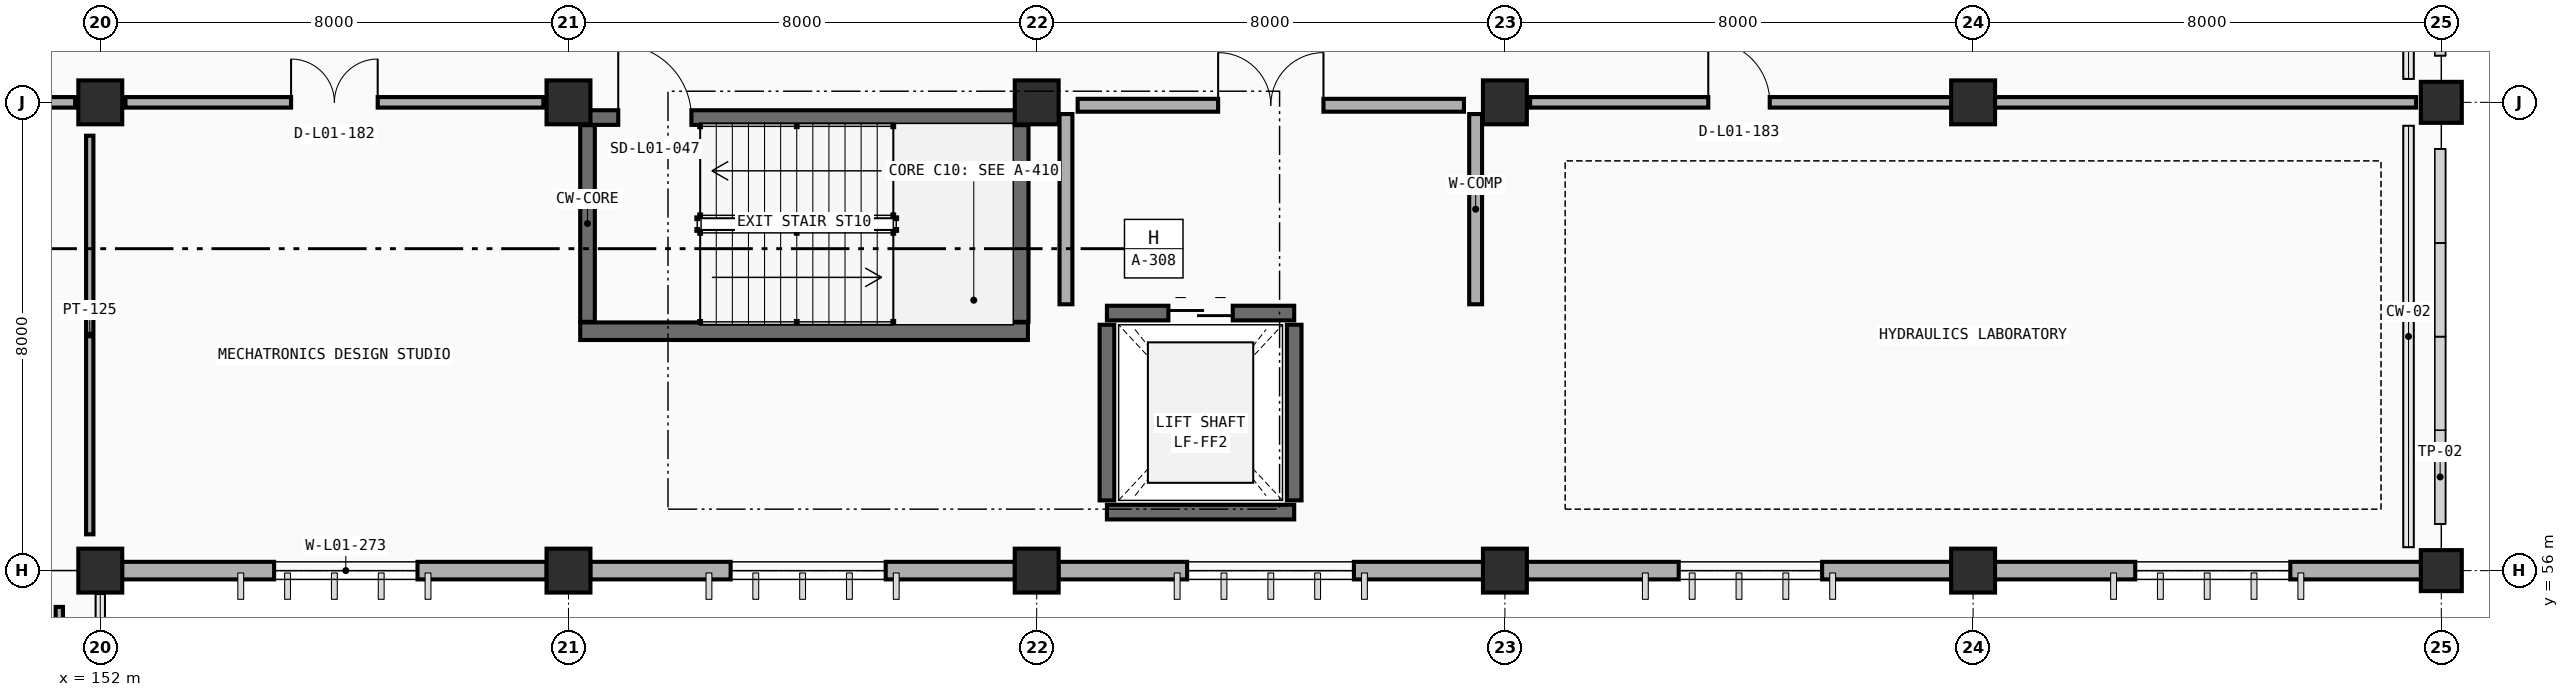
"""IFC4 building model, lengths in metres.
Left out: names, types, materials, properties, quantities, classifications, styles, units other than length and angle.
Written with IfcOpenShell. Run it as: python <this file> out.ifc"""

import sys

from ifc_helpers import new_model, si_unit, direction, frame, frame_2d, origin, origin_2d, place, context, subcontext, project, spatial, rectangle, extrude, element, fill, save


model = new_model("IFC4")
c1 = context("Model", 3, precision=1e-05, world=origin(), true_north=direction((0.0, 1.0)))
c2 = subcontext(c1, "Body", "Model", "MODEL_VIEW")
j1 = project(units=[si_unit("LENGTHUNIT", "METRE"), si_unit("PLANEANGLEUNIT", "RADIAN")], contexts=[c1])
p1 = place(None, origin())
s1 = spatial("IfcSite", under=j1, at=p1, CompositionType="ELEMENT")
p2 = place(p1, origin())
s2 = spatial("IfcBuilding", under=s1, at=p2, CompositionType="ELEMENT")
p3 = place(p2, origin())
s3 = spatial("IfcBuildingStorey", under=s2, at=p3, CompositionType="ELEMENT", Elevation=0.0)
for number, where, z_axis, x_axis in (
    (1, (152.0, 56.0, 0.0), (0.0, 0.0, 1.0), (1.0, 0.0, 0.0)),
    (2, (160.0, 56.0, 0.0), (0.0, 0.0, 1.0), (1.0, 0.0, 0.0)),
    (3, (168.0, 56.0, 0.0), (0.0, 0.0, 1.0), (1.0, 0.0, 0.0)),
    (4, (176.0, 56.0, 0.0), (0.0, 0.0, 1.0), (1.0, 0.0, 0.0)),
    (5, (184.0, 56.0, 0.0), (0.0, 0.0, 1.0), (1.0, 0.0, 0.0)),
):
    element("IfcColumn", number, at=place(p3, frame(where, z_axis=z_axis, x_axis=x_axis)), inside=s3, PredefinedType="COLUMN", context=c2, shape_type="SweptSolid", body=[
        extrude(rectangle(XDim=0.75, YDim=0.75, at=origin_2d()), origin(), (0.0, 0.0, 1.0), 4.8),
    ])
p4 = place(p3, frame((192.0, 56.0, 0.0), z_axis=(0.0, 0.0, 1.0), x_axis=(1.0, 0.0, 0.0)))
e6 = element("IfcColumn", 6, at=p4, inside=s3, PredefinedType="COLUMN", context=c2, shape_type="SweptSolid", body=[
    extrude(rectangle(XDim=0.7, YDim=0.7, at=origin_2d()), origin(), (0.0, 0.0, 1.0), 4.8),
])
for number, where, z_axis, x_axis in (
    (7, (152.0, 64.0, 0.0), (0.0, 0.0, 1.0), (1.0, 0.0, 0.0)),
    (8, (160.0, 64.0, 0.0), (0.0, 0.0, 1.0), (1.0, 0.0, 0.0)),
    (9, (168.0, 64.0, 0.0), (0.0, 0.0, 1.0), (1.0, 0.0, 0.0)),
    (10, (176.0, 64.0, 0.0), (0.0, 0.0, 1.0), (1.0, 0.0, 0.0)),
    (11, (184.0, 64.0, 0.0), (0.0, 0.0, 1.0), (1.0, 0.0, 0.0)),
):
    element("IfcColumn", number, at=place(p3, frame(where, z_axis=z_axis, x_axis=x_axis)), inside=s3, PredefinedType="COLUMN", context=c2, shape_type="SweptSolid", body=[
        extrude(rectangle(XDim=0.75, YDim=0.75, at=origin_2d()), origin(), (0.0, 0.0, 1.0), 4.8),
    ])
p5 = place(p3, frame((192.0, 64.0, 0.0), z_axis=(0.0, 0.0, 1.0), x_axis=(1.0, 0.0, 0.0)))
e12 = element("IfcColumn", 12, at=p5, inside=s3, PredefinedType="COLUMN", context=c2, shape_type="SweptSolid", body=[
    extrude(rectangle(XDim=0.7, YDim=0.7, at=origin_2d()), origin(), (0.0, 0.0, 1.0), 4.8),
])
p6 = place(p3, frame((159.628, 56.0, 0.0), z_axis=(0.0, 0.0, 1.0), x_axis=(-1.0, 0.0, 0.0)))
e13 = element("IfcWall", 13, at=p6, inside=s3, PredefinedType="STANDARD", context=c2, shape_type="SweptSolid", body=[
    extrude(rectangle(XDim=7.256, YDim=0.3, at=frame_2d((3.628, 0.0))), origin(), (0.0, 0.0, 1.0), 3.91),
])
p7 = place(p6, frame((2.208, 0.0, 0.9)))
e14 = element("IfcOpeningElement", 14, at=p7, cuts=e13, PredefinedType="OPENING", context=c2, shape_type="SweptSolid", body=[
    extrude(rectangle(XDim=2.45, YDim=1.85, at=frame_2d((1.225, 0.925))), frame((0.0, 0.16, 0.0), z_axis=(0.0, -1.0, 0.0), x_axis=(1.0, 0.0, 0.0)), (0.0, 0.0, 1.0), 0.32),
])
p8 = place(p3, frame((167.628, 56.0, 0.0), z_axis=(0.0, 0.0, 1.0), x_axis=(-1.0, 0.0, 0.0)))
e15 = element("IfcWall", 15, at=p8, inside=s3, PredefinedType="STANDARD", context=c2, shape_type="SweptSolid", body=[
    extrude(rectangle(XDim=7.256, YDim=0.3, at=frame_2d((3.628, 0.0))), origin(), (0.0, 0.0, 1.0), 3.91),
])
p9 = place(p8, frame((2.208, 0.0, 0.9)))
e16 = element("IfcOpeningElement", 16, at=p9, cuts=e15, PredefinedType="OPENING", context=c2, shape_type="SweptSolid", body=[
    extrude(rectangle(XDim=2.65, YDim=1.85, at=frame_2d((1.325, 0.925))), frame((0.0, 0.16, 0.0), z_axis=(0.0, -1.0, 0.0), x_axis=(1.0, 0.0, 0.0)), (0.0, 0.0, 1.0), 0.32),
])
p10 = place(p3, frame((175.628, 56.0, 0.0), z_axis=(0.0, 0.0, 1.0), x_axis=(-1.0, 0.0, 0.0)))
e17 = element("IfcWall", 17, at=p10, inside=s3, PredefinedType="STANDARD", context=c2, shape_type="SweptSolid", body=[
    extrude(rectangle(XDim=7.256, YDim=0.3, at=frame_2d((3.628, 0.0))), origin(), (0.0, 0.0, 1.0), 3.91),
])
p11 = place(p10, frame((2.208, 0.0, 0.9)))
e18 = element("IfcOpeningElement", 18, at=p11, cuts=e17, PredefinedType="OPENING", context=c2, shape_type="SweptSolid", body=[
    extrude(rectangle(XDim=2.85, YDim=1.85, at=frame_2d((1.425, 0.925))), frame((0.0, 0.16, 0.0), z_axis=(0.0, -1.0, 0.0), x_axis=(1.0, 0.0, 0.0)), (0.0, 0.0, 1.0), 0.32),
])
p12 = place(p3, frame((183.628, 56.0, 0.0), z_axis=(0.0, 0.0, 1.0), x_axis=(-1.0, 0.0, 0.0)))
e19 = element("IfcWall", 19, at=p12, inside=s3, PredefinedType="STANDARD", context=c2, shape_type="SweptSolid", body=[
    extrude(rectangle(XDim=7.256, YDim=0.3, at=frame_2d((3.628, 0.0))), origin(), (0.0, 0.0, 1.0), 3.91),
])
p13 = place(p12, frame((2.208, 0.0, 0.9)))
e20 = element("IfcOpeningElement", 20, at=p13, cuts=e19, PredefinedType="OPENING", context=c2, shape_type="SweptSolid", body=[
    extrude(rectangle(XDim=2.45, YDim=1.85, at=frame_2d((1.225, 0.925))), frame((0.0, 0.16, 0.0), z_axis=(0.0, -1.0, 0.0), x_axis=(1.0, 0.0, 0.0)), (0.0, 0.0, 1.0), 0.32),
])
p14 = place(p3, frame((191.653, 56.0, 0.0), z_axis=(0.0, 0.0, 1.0), x_axis=(-1.0, 0.0, 0.0)))
e21 = element("IfcWall", 21, at=p14, inside=s3, PredefinedType="STANDARD", context=c2, shape_type="SweptSolid", body=[
    extrude(rectangle(XDim=7.281, YDim=0.3, at=frame_2d((3.641, 0.0))), origin(), (0.0, 0.0, 1.0), 3.91),
])
p15 = place(p14, frame((2.233, 0.0, 0.9)))
e22 = element("IfcOpeningElement", 22, at=p15, cuts=e21, PredefinedType="OPENING", context=c2, shape_type="SweptSolid", body=[
    extrude(rectangle(XDim=2.65, YDim=1.85, at=frame_2d((1.325, 0.925))), frame((0.0, 0.16, 0.0), z_axis=(0.0, -1.0, 0.0), x_axis=(1.0, 0.0, 0.0)), (0.0, 0.0, 1.0), 0.32),
])
for number, where, z_axis, x_axis in (
    (23, (191.76, 56.22, 0.0), (0.0, 0.0, 1.0), (-1.0, 0.0, 0.0)),
    (24, (191.76, 63.78, 0.0), (0.0, 0.0, 1.0), (-1.0, 0.0, 0.0)),
    (25, (191.76, 64.22, 0.0), (0.0, 0.0, 1.0), (-1.0, 0.0, 0.0)),
):
    element("IfcWall", number, at=place(p3, frame(where, z_axis=z_axis, x_axis=x_axis)), inside=s3, PredefinedType="PARAPET", context=c2, shape_type="SweptSolid", body=[
        extrude(rectangle(XDim=0.32, YDim=0.2, at=frame_2d((0.16, 0.0))), origin(), (0.0, 0.0, 1.0), 3.95),
    ])
p16 = place(p3, frame((160.2, 60.09, 0.0), z_axis=(0.0, 0.0, 1.0), x_axis=(1.0, 0.0, 0.0)))
e26 = element("IfcWall", 26, at=p16, inside=s3, PredefinedType="SHEAR", context=c2, shape_type="SweptSolid", body=[
    extrude(rectangle(XDim=7.65, YDim=0.3, at=frame_2d((3.825, 0.0))), origin(), (0.0, 0.0, 1.0), 4.8),
])
p17 = place(p3, frame((167.71, 60.25, 0.0), z_axis=(0.0, 0.0, 1.0), x_axis=(0.0, 1.0, 0.0)))
e27 = element("IfcWall", 27, at=p17, inside=s3, PredefinedType="SHEAR", context=c2, shape_type="SweptSolid", body=[
    extrude(rectangle(XDim=3.36, YDim=0.3, at=frame_2d((1.68, 0.0))), origin(), (0.0, 0.0, 1.0), 4.8),
])
p18 = place(p3, frame((160.2, 63.74, 0.0), z_axis=(0.0, 0.0, 1.0), x_axis=(1.0, 0.0, 0.0)))
e28 = element("IfcWall", 28, at=p18, inside=s3, PredefinedType="SOLIDWALL", context=c2, shape_type="SweptSolid", body=[
    extrude(rectangle(XDim=7.65, YDim=0.25, at=frame_2d((3.825, 0.0))), origin(), (0.0, 0.0, 1.0), 4.8),
])
p19 = place(p18, frame((0.65, 0.0, 0.0)))
e29 = element("IfcOpeningElement", 29, at=p19, cuts=e28, PredefinedType="OPENING", context=c2, shape_type="SweptSolid", body=[
    extrude(rectangle(XDim=1.25, YDim=2.15, at=frame_2d((0.625, 1.075))), frame((0.0, 0.135, 0.0), z_axis=(0.0, -1.0, 0.0), x_axis=(1.0, 0.0, 0.0)), (0.0, 0.0, 1.0), 0.27),
])
p20 = place(p3, frame((160.325, 60.25, 0.0), z_axis=(0.0, 0.0, 1.0), x_axis=(0.0, 1.0, 0.0)))
e30 = element("IfcWall", 30, at=p20, inside=s3, PredefinedType="SOLIDWALL", context=c2, shape_type="SweptSolid", body=[
    extrude(rectangle(XDim=3.36, YDim=0.25, at=frame_2d((1.68, 0.0))), origin(), (0.0, 0.0, 1.0), 4.8),
])
p21 = place(p3, frame((169.2, 57.0, 0.0), z_axis=(0.0, 0.0, 1.0), x_axis=(1.0, 0.0, 0.0)))
e31 = element("IfcWall", 31, at=p21, inside=s3, PredefinedType="SOLIDWALL", context=c2, shape_type="SweptSolid", body=[
    extrude(rectangle(XDim=3.2, YDim=0.25, at=frame_2d((1.6, 0.0))), origin(), (0.0, 0.0, 1.0), 4.8),
])
p22 = place(p3, frame((169.2, 60.4, 0.0), z_axis=(0.0, 0.0, 1.0), x_axis=(1.0, 0.0, 0.0)))
e32 = element("IfcWall", 32, at=p22, inside=s3, PredefinedType="SOLIDWALL", context=c2, shape_type="SweptSolid", body=[
    extrude(rectangle(XDim=3.2, YDim=0.25, at=frame_2d((1.6, 0.0))), origin(), (0.0, 0.0, 1.0), 4.8),
])
p23 = place(p22, frame((1.05, 0.0, 0.0)))
e33 = element("IfcOpeningElement", 33, at=p23, cuts=e32, PredefinedType="OPENING", context=c2, shape_type="SweptSolid", body=[
    extrude(rectangle(XDim=1.1, YDim=2.15, at=frame_2d((0.55, 1.075))), frame((0.0, 0.135, 0.0), z_axis=(0.0, -1.0, 0.0), x_axis=(1.0, 0.0, 0.0)), (0.0, 0.0, 1.0), 0.27),
])
for number, where, z_axis, x_axis in (
    (34, (169.2, 57.2, 0.0), (0.0, 0.0, 1.0), (0.0, 1.0, 0.0)),
    (35, (172.4, 57.2, 0.0), (0.0, 0.0, 1.0), (0.0, 1.0, 0.0)),
):
    element("IfcWall", number, at=place(p3, frame(where, z_axis=z_axis, x_axis=x_axis)), inside=s3, PredefinedType="SOLIDWALL", context=c2, shape_type="SweptSolid", body=[
        extrude(rectangle(XDim=3.0, YDim=0.25, at=frame_2d((1.5, 0.0))), origin(), (0.0, 0.0, 1.0), 4.8),
    ])
p24 = place(p3, frame((168.7, 63.95, 0.0), z_axis=(0.0, 0.0, 1.0), x_axis=(1.0, 0.0, 0.0)))
e36 = element("IfcWall", 36, at=p24, inside=s3, PredefinedType="PARTITIONING", context=c2, shape_type="SweptSolid", body=[
    extrude(rectangle(XDim=6.6, YDim=0.22, at=frame_2d((3.3, 0.0))), origin(), (0.0, 0.0, 1.0), 3.81),
])
p25 = place(p24, frame((2.4, 0.0, 0.0)))
e37 = element("IfcOpeningElement", 37, at=p25, cuts=e36, PredefinedType="OPENING", context=c2, shape_type="SweptSolid", body=[
    extrude(rectangle(XDim=1.8, YDim=2.2, at=frame_2d((0.9, 1.1))), frame((0.0, 0.12, 0.0), z_axis=(0.0, -1.0, 0.0), x_axis=(1.0, 0.0, 0.0)), (0.0, 0.0, 1.0), 0.24),
])
for number, where, z_axis, x_axis in (
    (38, (168.5, 60.55, 0.0), (0.0, 0.0, 1.0), (0.0, 1.0, 0.0)),
    (39, (175.5, 60.55, 0.0), (0.0, 0.0, 1.0), (0.0, 1.0, 0.0)),
):
    element("IfcWall", number, at=place(p3, frame(where, z_axis=z_axis, x_axis=x_axis)), inside=s3, PredefinedType="PARTITIONING", context=c2, shape_type="SweptSolid", body=[
        extrude(rectangle(XDim=3.25, YDim=0.22, at=frame_2d((1.625, 0.0))), origin(), (0.0, 0.0, 1.0), 3.76),
    ])
p26 = place(p3, frame((136.43, 64.0, 0.0), z_axis=(0.0, 0.0, 1.0), x_axis=(1.0, 0.0, 0.0)))
e40 = element("IfcWall", 40, at=p26, inside=s3, PredefinedType="PARTITIONING", context=c2, shape_type="SweptSolid", body=[
    extrude(rectangle(XDim=15.14, YDim=0.18, at=frame_2d((7.57, 0.0))), origin(), (0.0, 0.0, 1.0), 3.81),
])
p27 = place(p26, frame((2.895, 0.0, 0.0)))
e41 = element("IfcOpeningElement", 41, at=p27, cuts=e40, PredefinedType="OPENING", context=c2, shape_type="SweptSolid", body=[
    extrude(rectangle(XDim=1.35, YDim=2.2, at=frame_2d((0.675, 1.1))), frame((0.0, 0.1, 0.0), z_axis=(0.0, -1.0, 0.0), x_axis=(1.0, 0.0, 0.0)), (0.0, 0.0, 1.0), 0.2),
])
p28 = place(p3, frame((151.82, 56.62, 0.0), z_axis=(0.0, 0.0, 1.0), x_axis=(0.0, 1.0, 0.0)))
e42 = element("IfcWall", 42, at=p28, inside=s3, PredefinedType="PARTITIONING", context=c2, shape_type="SweptSolid", body=[
    extrude(rectangle(XDim=6.81, YDim=0.125, at=frame_2d((3.405, 0.0))), origin(), (0.0, 0.0, 1.0), 3.76),
])
p29 = place(p3, frame((152.43, 64.0, 0.0), z_axis=(0.0, 0.0, 1.0), x_axis=(1.0, 0.0, 0.0)))
e43 = element("IfcWall", 43, at=p29, inside=s3, PredefinedType="PARTITIONING", context=c2, shape_type="SweptSolid", body=[
    extrude(rectangle(XDim=7.14, YDim=0.18, at=frame_2d((3.57, 0.0))), origin(), (0.0, 0.0, 1.0), 3.81),
])
p30 = place(p29, frame((2.83, 0.0, 0.0)))
e44 = element("IfcOpeningElement", 44, at=p30, cuts=e43, PredefinedType="OPENING", context=c2, shape_type="SweptSolid", body=[
    extrude(rectangle(XDim=1.48, YDim=2.2, at=frame_2d((0.74, 1.1))), frame((0.0, 0.1, 0.0), z_axis=(0.0, -1.0, 0.0), x_axis=(1.0, 0.0, 0.0)), (0.0, 0.0, 1.0), 0.2),
])
p31 = place(p3, frame((176.43, 64.0, 0.0), z_axis=(0.0, 0.0, 1.0), x_axis=(1.0, 0.0, 0.0)))
e45 = element("IfcWall", 45, at=p31, inside=s3, PredefinedType="PARTITIONING", context=c2, shape_type="SweptSolid", body=[
    extrude(rectangle(XDim=15.14, YDim=0.18, at=frame_2d((7.57, 0.0))), origin(), (0.0, 0.0, 1.0), 3.81),
])
p32 = place(p31, frame((3.045, 0.0, 0.0)))
e46 = element("IfcOpeningElement", 46, at=p32, cuts=e45, PredefinedType="OPENING", context=c2, shape_type="SweptSolid", body=[
    extrude(rectangle(XDim=1.05, YDim=2.15, at=frame_2d((0.525, 1.075))), frame((0.0, 0.1, 0.0), z_axis=(0.0, -1.0, 0.0), x_axis=(1.0, 0.0, 0.0)), (0.0, 0.0, 1.0), 0.2),
])
p33 = place(p3, frame((151.3, 48.62, 0.0), z_axis=(0.0, 0.0, 1.0), x_axis=(0.0, 1.0, 0.0)))
e47 = element("IfcWall", 47, at=p33, inside=s3, PredefinedType="PARTITIONING", context=c2, shape_type="SweptSolid", body=[
    extrude(rectangle(XDim=6.76, YDim=0.125, at=frame_2d((3.38, 0.0))), origin(), (0.0, 0.0, 1.0), 3.9),
])
p34 = place(p7, origin())
e48 = element("IfcWindow", 48, at=p34, inside=s3, PartitioningType="DOUBLE_PANEL_VERTICAL", PredefinedType="WINDOW", context=c2, shape_type="SweptSolid", body=[
    extrude(rectangle(XDim=2.45, YDim=1.85, at=frame_2d((1.225, 0.925))), frame((0.0, 0.03, 0.0), z_axis=(0.0, -1.0, 0.0), x_axis=(1.0, 0.0, 0.0)), (0.0, 0.0, 1.0), 0.06),
])
fill(e14, e48)
p35 = place(p9, origin())
e49 = element("IfcWindow", 49, at=p35, inside=s3, PartitioningType="DOUBLE_PANEL_VERTICAL", PredefinedType="WINDOW", context=c2, shape_type="SweptSolid", body=[
    extrude(rectangle(XDim=2.65, YDim=1.85, at=frame_2d((1.325, 0.925))), frame((0.0, 0.03, 0.0), z_axis=(0.0, -1.0, 0.0), x_axis=(1.0, 0.0, 0.0)), (0.0, 0.0, 1.0), 0.06),
])
fill(e16, e49)
p36 = place(p11, origin())
e50 = element("IfcWindow", 50, at=p36, inside=s3, PartitioningType="DOUBLE_PANEL_VERTICAL", PredefinedType="WINDOW", context=c2, shape_type="SweptSolid", body=[
    extrude(rectangle(XDim=2.85, YDim=1.85, at=frame_2d((1.425, 0.925))), frame((0.0, 0.03, 0.0), z_axis=(0.0, -1.0, 0.0), x_axis=(1.0, 0.0, 0.0)), (0.0, 0.0, 1.0), 0.06),
])
fill(e18, e50)
p37 = place(p13, origin())
e51 = element("IfcWindow", 51, at=p37, inside=s3, PartitioningType="DOUBLE_PANEL_VERTICAL", PredefinedType="WINDOW", context=c2, shape_type="SweptSolid", body=[
    extrude(rectangle(XDim=2.45, YDim=1.85, at=frame_2d((1.225, 0.925))), frame((0.0, 0.03, 0.0), z_axis=(0.0, -1.0, 0.0), x_axis=(1.0, 0.0, 0.0)), (0.0, 0.0, 1.0), 0.06),
])
fill(e20, e51)
p38 = place(p15, origin())
e52 = element("IfcWindow", 52, at=p38, inside=s3, PartitioningType="DOUBLE_PANEL_VERTICAL", PredefinedType="WINDOW", context=c2, shape_type="SweptSolid", body=[
    extrude(rectangle(XDim=2.65, YDim=1.85, at=frame_2d((1.325, 0.925))), frame((0.0, 0.03, 0.0), z_axis=(0.0, -1.0, 0.0), x_axis=(1.0, 0.0, 0.0)), (0.0, 0.0, 1.0), 0.06),
])
fill(e22, e52)
p39 = place(p19, origin())
e53 = element("IfcDoor", 53, at=p39, inside=s3, OperationType="SINGLE_SWING_LEFT", PredefinedType="DOOR", context=c2, shape_type="SweptSolid", body=[
    extrude(rectangle(XDim=1.25, YDim=2.15, at=frame_2d((0.625, 1.075))), frame((0.0, 0.025, 0.0), z_axis=(0.0, -1.0, 0.0), x_axis=(1.0, 0.0, 0.0)), (0.0, 0.0, 1.0), 0.05),
])
fill(e29, e53)
p40 = place(p23, origin())
e54 = element("IfcDoor", 54, at=p40, inside=s3, OperationType="DOUBLE_DOOR_SLIDING", PredefinedType="DOOR", context=c2, shape_type="SweptSolid", body=[
    extrude(rectangle(XDim=1.1, YDim=2.15, at=frame_2d((0.55, 1.075))), frame((0.0, 0.025, 0.0), z_axis=(0.0, -1.0, 0.0), x_axis=(1.0, 0.0, 0.0)), (0.0, 0.0, 1.0), 0.05),
])
fill(e33, e54)
p41 = place(p25, origin())
e55 = element("IfcDoor", 55, at=p41, inside=s3, OperationType="DOUBLE_DOOR_SINGLE_SWING", PredefinedType="DOOR", context=c2, shape_type="SweptSolid", body=[
    extrude(rectangle(XDim=1.8, YDim=2.2, at=frame_2d((0.9, 1.1))), frame((0.0, 0.025, 0.0), z_axis=(0.0, -1.0, 0.0), x_axis=(1.0, 0.0, 0.0)), (0.0, 0.0, 1.0), 0.05),
])
fill(e37, e55)
p42 = place(p30, origin())
e56 = element("IfcDoor", 56, at=p42, inside=s3, OperationType="DOUBLE_DOOR_SINGLE_SWING", PredefinedType="DOOR", context=c2, shape_type="SweptSolid", body=[
    extrude(rectangle(XDim=1.48, YDim=2.2, at=frame_2d((0.74, 1.1))), frame((0.0, 0.025, 0.0), z_axis=(0.0, -1.0, 0.0), x_axis=(1.0, 0.0, 0.0)), (0.0, 0.0, 1.0), 0.05),
])
fill(e44, e56)
p43 = place(p32, origin())
e57 = element("IfcDoor", 57, at=p43, inside=s3, OperationType="SINGLE_SWING_LEFT", PredefinedType="DOOR", context=c2, shape_type="SweptSolid", body=[
    extrude(rectangle(XDim=1.05, YDim=2.15, at=frame_2d((0.525, 1.075))), frame((0.0, 0.025, 0.0), z_axis=(0.0, -1.0, 0.0), x_axis=(1.0, 0.0, 0.0)), (0.0, 0.0, 1.0), 0.05),
])
fill(e46, e57)
save(model, sys.argv[1])
